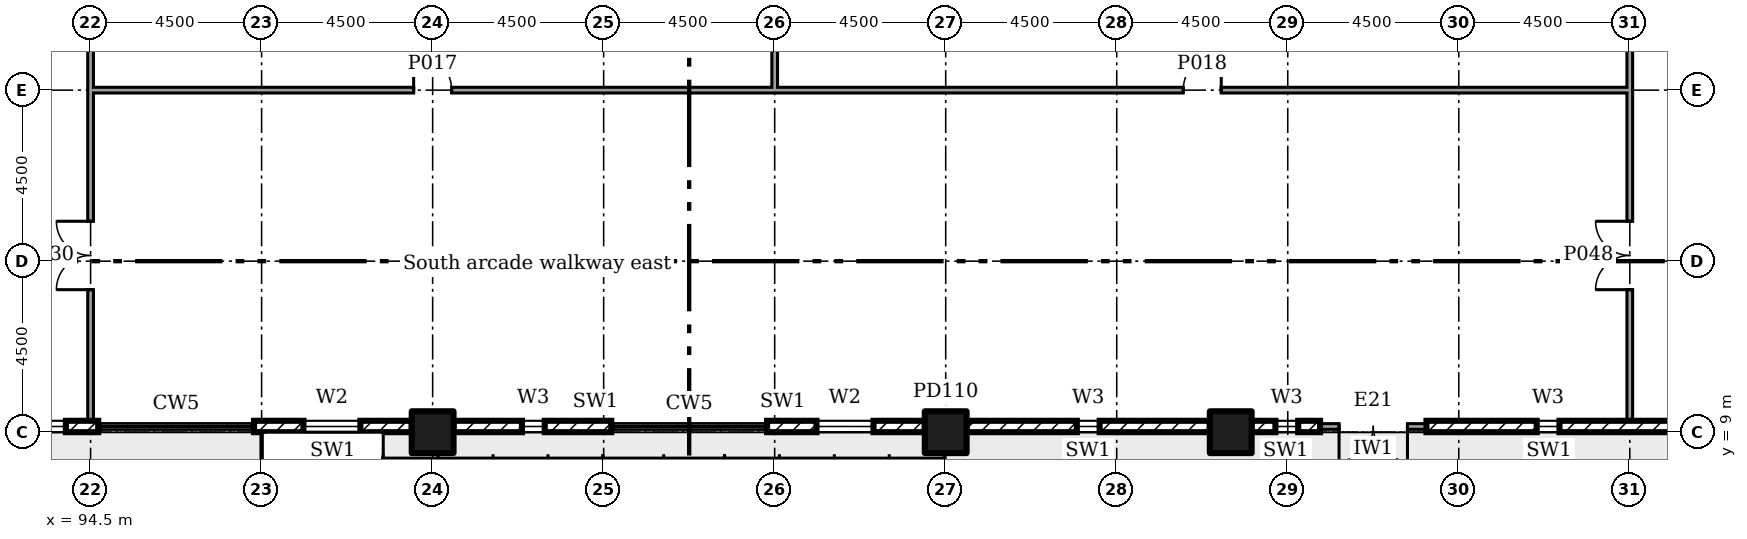
"""IFC4 building model, lengths in metres.
Left out: names, types, materials, properties, quantities, classifications, styles, units other than length and angle.
Written with IfcOpenShell. Run it as: python <this file> out.ifc"""

import sys

from ifc_helpers import new_model, si_unit, direction, frame, frame_2d, origin, origin_2d, place, context, subcontext, project, spatial, rectangle, extrude, element, fill, save


model = new_model("IFC4")
c1 = context("Model", 3, precision=1e-05, world=origin(), true_north=direction((0.0, 1.0)))
c2 = subcontext(c1, "Body", "Model", "MODEL_VIEW")
j1 = project(units=[si_unit("LENGTHUNIT", "METRE"), si_unit("PLANEANGLEUNIT", "RADIAN")], contexts=[c1])
p1 = place(None, origin())
s1 = spatial("IfcSite", under=j1, at=p1, CompositionType="ELEMENT")
p2 = place(p1, origin())
s2 = spatial("IfcBuilding", under=s1, at=p2, CompositionType="ELEMENT")
p3 = place(p2, frame((0.0, 0.0, 6.0)))
s3 = spatial("IfcBuildingStorey", under=s2, at=p3, CompositionType="ELEMENT", Elevation=6.0)
for number, where in (
    (1, (103.5, 9.0, 0.0)),
    (2, (117.0, 9.0, 0.0)),
    (3, (124.5, 9.0, 0.0)),
):
    element("IfcColumn", number, at=place(p3, frame(where)), inside=s3, PredefinedType="COLUMN", context=c2, shape_type="SweptSolid", body=[
        extrude(rectangle(XDim=1.1, YDim=1.1, at=origin_2d()), origin(), (0.0, 0.0, 1.0), 5.5),
    ])
p4 = place(p3, frame((90.55, 9.15, 0.0)))
e4 = element("IfcWall", 4, at=p4, inside=s3, PredefinedType="ELEMENTEDWALL", context=c2, shape_type="SweptSolid", body=[
    extrude(rectangle(XDim=4.15, YDim=0.3, at=frame_2d((2.075, 0.0))), origin(), (0.0, 0.0, 1.0), 5.05),
])
p5 = place(p4, frame((0.9, 0.0, 0.45)))
e5 = element("IfcOpeningElement", 5, at=p5, cuts=e4, PredefinedType="OPENING", context=c2, shape_type="SweptSolid", body=[
    extrude(rectangle(XDim=2.4, YDim=2.4, at=frame_2d((1.2, 1.2))), frame((0.0, 0.16, 0.0), z_axis=(0.0, -1.0, 0.0), x_axis=(1.0, 0.0, 0.0)), (0.0, 0.0, 1.0), 0.32),
])
p6 = place(p3, frame((98.8, 9.15, 0.0)))
e6 = element("IfcWall", 6, at=p6, inside=s3, PredefinedType="ELEMENTEDWALL", context=c2, shape_type="SweptSolid", body=[
    extrude(rectangle(XDim=4.15, YDim=0.3, at=frame_2d((2.075, 0.0))), origin(), (0.0, 0.0, 1.0), 5.05),
])
p7 = place(p6, frame((1.3, 0.0, 0.9)))
e7 = element("IfcOpeningElement", 7, at=p7, cuts=e6, PredefinedType="OPENING", context=c2, shape_type="SweptSolid", body=[
    extrude(rectangle(XDim=1.5, YDim=1.8, at=frame_2d((0.75, 0.9))), frame((0.0, 0.16, 0.0), z_axis=(0.0, -1.0, 0.0), x_axis=(1.0, 0.0, 0.0)), (0.0, 0.0, 1.0), 0.32),
])
p8 = place(p3, frame((104.05, 9.15, 0.0)))
e8 = element("IfcWall", 8, at=p8, inside=s3, PredefinedType="ELEMENTEDWALL", context=c2, shape_type="SweptSolid", body=[
    extrude(rectangle(XDim=4.15, YDim=0.3, at=frame_2d((2.075, 0.0))), origin(), (0.0, 0.0, 1.0), 5.05),
])
p9 = place(p8, frame((1.8, 0.0, 0.45)))
e9 = element("IfcOpeningElement", 9, at=p9, cuts=e8, PredefinedType="OPENING", context=c2, shape_type="SweptSolid", body=[
    extrude(rectangle(XDim=0.6, YDim=2.4, at=frame_2d((0.3, 1.2))), frame((0.0, 0.16, 0.0), z_axis=(0.0, -1.0, 0.0), x_axis=(1.0, 0.0, 0.0)), (0.0, 0.0, 1.0), 0.32),
])
p10 = place(p3, frame((112.3, 9.15, 0.0)))
e10 = element("IfcWall", 10, at=p10, inside=s3, PredefinedType="ELEMENTEDWALL", context=c2, shape_type="SweptSolid", body=[
    extrude(rectangle(XDim=4.15, YDim=0.3, at=frame_2d((2.075, 0.0))), origin(), (0.0, 0.0, 1.0), 5.05),
])
p11 = place(p10, frame((1.3, 0.0, 0.9)))
e11 = element("IfcOpeningElement", 11, at=p11, cuts=e10, PredefinedType="OPENING", context=c2, shape_type="SweptSolid", body=[
    extrude(rectangle(XDim=1.5, YDim=1.8, at=frame_2d((0.75, 0.9))), frame((0.0, 0.16, 0.0), z_axis=(0.0, -1.0, 0.0), x_axis=(1.0, 0.0, 0.0)), (0.0, 0.0, 1.0), 0.32),
])
p12 = place(p3, frame((117.55, 9.15, 0.0)))
e12 = element("IfcWall", 12, at=p12, inside=s3, PredefinedType="ELEMENTEDWALL", context=c2, shape_type="SweptSolid", body=[
    extrude(rectangle(XDim=6.4, YDim=0.3, at=frame_2d((3.2, 0.0))), origin(), (0.0, 0.0, 1.0), 5.05),
])
p13 = place(p12, frame((2.9, 0.0, 0.45)))
e13 = element("IfcOpeningElement", 13, at=p13, cuts=e12, PredefinedType="OPENING", context=c2, shape_type="SweptSolid", body=[
    extrude(rectangle(XDim=0.6, YDim=2.4, at=frame_2d((0.3, 1.2))), frame((0.0, 0.16, 0.0), z_axis=(0.0, -1.0, 0.0), x_axis=(1.0, 0.0, 0.0)), (0.0, 0.0, 1.0), 0.32),
])
p14 = place(p3, frame((125.05, 9.15, 0.0)))
e14 = element("IfcWall", 14, at=p14, inside=s3, PredefinedType="ELEMENTEDWALL", context=c2, shape_type="SweptSolid", body=[
    extrude(rectangle(XDim=1.8, YDim=0.3, at=frame_2d((0.9, 0.0))), origin(), (0.0, 0.0, 1.0), 5.05),
])
p15 = place(p14, frame((0.625, 0.0, 0.45)))
e15 = element("IfcOpeningElement", 15, at=p15, cuts=e14, PredefinedType="OPENING", context=c2, shape_type="SweptSolid", body=[
    extrude(rectangle(XDim=0.6, YDim=2.4, at=frame_2d((0.3, 1.2))), frame((0.0, 0.16, 0.0), z_axis=(0.0, -1.0, 0.0), x_axis=(1.0, 0.0, 0.0)), (0.0, 0.0, 1.0), 0.32),
])
p16 = place(p3, frame((126.85, 9.15, 0.0)))
e16 = element("IfcWall", 16, at=p16, inside=s3, PredefinedType="SOLIDWALL", context=c2, shape_type="SweptSolid", body=[
    extrude(rectangle(XDim=2.8, YDim=0.15, at=frame_2d((1.4, 0.0))), origin(), (0.0, 0.0, 1.0), 5.05),
])
p17 = place(p16, frame((0.5, 0.0, 0.0)))
e17 = element("IfcOpeningElement", 17, at=p17, cuts=e16, PredefinedType="OPENING", context=c2, shape_type="SweptSolid", body=[
    extrude(rectangle(XDim=1.8, YDim=2.4, at=frame_2d((0.9, 1.2))), frame((0.0, 0.085, 0.0), z_axis=(0.0, -1.0, 0.0), x_axis=(1.0, 0.0, 0.0)), (0.0, 0.0, 1.0), 0.17),
])
p18 = place(p3, frame((129.65, 9.15, 0.0)))
e18 = element("IfcWall", 18, at=p18, inside=s3, PredefinedType="ELEMENTEDWALL", context=c2, shape_type="SweptSolid", body=[
    extrude(rectangle(XDim=6.45, YDim=0.3, at=frame_2d((3.225, 0.0))), origin(), (0.0, 0.0, 1.0), 5.05),
])
p19 = place(p18, frame((2.9, 0.0, 0.45)))
e19 = element("IfcOpeningElement", 19, at=p19, cuts=e18, PredefinedType="OPENING", context=c2, shape_type="SweptSolid", body=[
    extrude(rectangle(XDim=0.6, YDim=2.4, at=frame_2d((0.3, 1.2))), frame((0.0, 0.16, 0.0), z_axis=(0.0, -1.0, 0.0), x_axis=(1.0, 0.0, 0.0)), (0.0, 0.0, 1.0), 0.32),
])
p20 = place(p3, frame((94.5, 9.3, 0.0), z_axis=(0.0, 0.0, 1.0), x_axis=(0.0, 1.0, 0.0)))
e20 = element("IfcWall", 20, at=p20, inside=s3, PredefinedType="PARTITIONING", context=c2, shape_type="SweptSolid", body=[
    extrude(rectangle(XDim=8.775, YDim=0.15, at=frame_2d((4.387, 0.0))), origin(), (0.0, 0.0, 1.0), 5.05),
])
p21 = place(p20, frame((3.45, 0.0, 0.0)))
e21 = element("IfcOpeningElement", 21, at=p21, cuts=e20, PredefinedType="OPENING", context=c2, shape_type="SweptSolid", body=[
    extrude(rectangle(XDim=1.8, YDim=2.1, at=frame_2d((0.9, 1.05))), frame((0.0, 0.085, 0.0), z_axis=(0.0, -1.0, 0.0), x_axis=(1.0, 0.0, 0.0)), (0.0, 0.0, 1.0), 0.17),
])
p22 = place(p3, frame((94.5, 18.0, 0.0), z_axis=(0.0, 0.0, 1.0), x_axis=(0.0, 1.0, 0.0)))
e22 = element("IfcWall", 22, at=p22, inside=s3, PredefinedType="PARTITIONING", context=c2, shape_type="SweptSolid", body=[
    extrude(rectangle(XDim=4.425, YDim=0.15, at=frame_2d((2.212, 0.0))), origin(), (0.0, 0.0, 1.0), 5.05),
])
p23 = place(p3, frame((135.0, 9.3, 0.0), z_axis=(0.0, 0.0, 1.0), x_axis=(0.0, 1.0, 0.0)))
e23 = element("IfcWall", 23, at=p23, inside=s3, PredefinedType="PARTITIONING", context=c2, shape_type="SweptSolid", body=[
    extrude(rectangle(XDim=8.775, YDim=0.15, at=frame_2d((4.387, 0.0))), origin(), (0.0, 0.0, 1.0), 5.05),
])
p24 = place(p23, frame((3.45, 0.0, 0.0)))
e24 = element("IfcOpeningElement", 24, at=p24, cuts=e23, PredefinedType="OPENING", context=c2, shape_type="SweptSolid", body=[
    extrude(rectangle(XDim=1.8, YDim=2.1, at=frame_2d((0.9, 1.05))), frame((0.0, 0.085, 0.0), z_axis=(0.0, -1.0, 0.0), x_axis=(1.0, 0.0, 0.0)), (0.0, 0.0, 1.0), 0.17),
])
p25 = place(p3, frame((94.575, 18.0, 0.0)))
e25 = element("IfcWall", 25, at=p25, inside=s3, PredefinedType="PARTITIONING", context=c2, shape_type="SweptSolid", body=[
    extrude(rectangle(XDim=18.0, YDim=0.15, at=frame_2d((9.0, 0.0))), origin(), (0.0, 0.0, 1.0), 5.05),
])
p26 = place(p25, frame((8.425, 0.0, 0.0)))
e26 = element("IfcOpeningElement", 26, at=p26, cuts=e25, PredefinedType="OPENING", context=c2, shape_type="SweptSolid", body=[
    extrude(rectangle(XDim=1.0, YDim=2.1, at=frame_2d((0.5, 1.05))), frame((0.0, 0.085, 0.0), z_axis=(0.0, -1.0, 0.0), x_axis=(1.0, 0.0, 0.0)), (0.0, 0.0, 1.0), 0.17),
])
p27 = place(p3, frame((112.5, 18.0, 0.0)))
e27 = element("IfcWall", 27, at=p27, inside=s3, PredefinedType="PARTITIONING", context=c2, shape_type="SweptSolid", body=[
    extrude(rectangle(XDim=22.425, YDim=0.15, at=frame_2d((11.212, 0.0))), origin(), (0.0, 0.0, 1.0), 5.05),
])
p28 = place(p27, frame((10.75, 0.0, 0.0)))
e28 = element("IfcOpeningElement", 28, at=p28, cuts=e27, PredefinedType="OPENING", context=c2, shape_type="SweptSolid", body=[
    extrude(rectangle(XDim=1.0, YDim=2.1, at=frame_2d((0.5, 1.05))), frame((0.0, 0.085, 0.0), z_axis=(0.0, -1.0, 0.0), x_axis=(1.0, 0.0, 0.0)), (0.0, 0.0, 1.0), 0.17),
])
p29 = place(p3, frame((135.0, 18.0, 0.0), z_axis=(0.0, 0.0, 1.0), x_axis=(0.0, 1.0, 0.0)))
e29 = element("IfcWall", 29, at=p29, inside=s3, PredefinedType="PARTITIONING", context=c2, shape_type="SweptSolid", body=[
    extrude(rectangle(XDim=9.075, YDim=0.15, at=frame_2d((4.538, 0.0))), origin(), (0.0, 0.0, 1.0), 5.05),
])
p30 = place(p3, frame((112.5, 18.075, 0.0), z_axis=(0.0, 0.0, 1.0), x_axis=(0.0, 1.0, 0.0)))
e30 = element("IfcWall", 30, at=p30, inside=s3, PredefinedType="PARTITIONING", context=c2, shape_type="SweptSolid", body=[
    extrude(rectangle(XDim=7.93, YDim=0.15, at=frame_2d((3.965, 0.0))), origin(), (0.0, 0.0, 1.0), 5.05),
])
p31 = place(p5, origin())
e31 = element("IfcWindow", 31, at=p31, inside=s3, PartitioningType="SINGLE_PANEL", PredefinedType="WINDOW", context=c2, shape_type="SweptSolid", body=[
    extrude(rectangle(XDim=2.4, YDim=2.4, at=frame_2d((1.2, 1.2))), frame((0.0, 0.03, 0.0), z_axis=(0.0, -1.0, 0.0), x_axis=(1.0, 0.0, 0.0)), (0.0, 0.0, 1.0), 0.06),
])
fill(e5, e31)
p32 = place(p7, origin())
e32 = element("IfcWindow", 32, at=p32, inside=s3, PartitioningType="SINGLE_PANEL", PredefinedType="WINDOW", context=c2, shape_type="SweptSolid", body=[
    extrude(rectangle(XDim=1.5, YDim=1.8, at=frame_2d((0.75, 0.9))), frame((0.0, 0.03, 0.0), z_axis=(0.0, -1.0, 0.0), x_axis=(1.0, 0.0, 0.0)), (0.0, 0.0, 1.0), 0.06),
])
fill(e7, e32)
p33 = place(p9, origin())
e33 = element("IfcWindow", 33, at=p33, inside=s3, PartitioningType="SINGLE_PANEL", PredefinedType="WINDOW", context=c2, shape_type="SweptSolid", body=[
    extrude(rectangle(XDim=0.6, YDim=2.4, at=frame_2d((0.3, 1.2))), frame((0.0, 0.03, 0.0), z_axis=(0.0, -1.0, 0.0), x_axis=(1.0, 0.0, 0.0)), (0.0, 0.0, 1.0), 0.06),
])
fill(e9, e33)
p34 = place(p11, origin())
e34 = element("IfcWindow", 34, at=p34, inside=s3, PartitioningType="SINGLE_PANEL", PredefinedType="WINDOW", context=c2, shape_type="SweptSolid", body=[
    extrude(rectangle(XDim=1.5, YDim=1.8, at=frame_2d((0.75, 0.9))), frame((0.0, 0.03, 0.0), z_axis=(0.0, -1.0, 0.0), x_axis=(1.0, 0.0, 0.0)), (0.0, 0.0, 1.0), 0.06),
])
fill(e11, e34)
p35 = place(p13, origin())
e35 = element("IfcWindow", 35, at=p35, inside=s3, PartitioningType="SINGLE_PANEL", PredefinedType="WINDOW", context=c2, shape_type="SweptSolid", body=[
    extrude(rectangle(XDim=0.6, YDim=2.4, at=frame_2d((0.3, 1.2))), frame((0.0, 0.03, 0.0), z_axis=(0.0, -1.0, 0.0), x_axis=(1.0, 0.0, 0.0)), (0.0, 0.0, 1.0), 0.06),
])
fill(e13, e35)
p36 = place(p15, origin())
e36 = element("IfcWindow", 36, at=p36, inside=s3, PartitioningType="SINGLE_PANEL", PredefinedType="WINDOW", context=c2, shape_type="SweptSolid", body=[
    extrude(rectangle(XDim=0.6, YDim=2.4, at=frame_2d((0.3, 1.2))), frame((0.0, 0.03, 0.0), z_axis=(0.0, -1.0, 0.0), x_axis=(1.0, 0.0, 0.0)), (0.0, 0.0, 1.0), 0.06),
])
fill(e15, e36)
p37 = place(p17, frame((1.8, 0.0, 0.0), x_axis=(-1.0, 0.0, 0.0)))
e37 = element("IfcDoor", 37, at=p37, inside=s3, OperationType="DOUBLE_DOOR_DOUBLE_SWING", PredefinedType="NOTDEFINED", context=c2, shape_type="SweptSolid", body=[
    extrude(rectangle(XDim=1.8, YDim=2.4, at=frame_2d((0.9, 1.2))), frame((0.0, 0.025, 0.0), z_axis=(0.0, -1.0, 0.0), x_axis=(1.0, 0.0, 0.0)), (0.0, 0.0, 1.0), 0.05),
])
fill(e17, e37)
p38 = place(p19, origin())
e38 = element("IfcWindow", 38, at=p38, inside=s3, PartitioningType="SINGLE_PANEL", PredefinedType="WINDOW", context=c2, shape_type="SweptSolid", body=[
    extrude(rectangle(XDim=0.6, YDim=2.4, at=frame_2d((0.3, 1.2))), frame((0.0, 0.03, 0.0), z_axis=(0.0, -1.0, 0.0), x_axis=(1.0, 0.0, 0.0)), (0.0, 0.0, 1.0), 0.06),
])
fill(e19, e38)
p39 = place(p26, origin())
e39 = element("IfcDoor", 39, at=p39, inside=s3, OperationType="SINGLE_SWING_RIGHT", PredefinedType="DOOR", context=c2, shape_type="SweptSolid", body=[
    extrude(rectangle(XDim=1.0, YDim=2.1, at=frame_2d((0.5, 1.05))), frame((0.0, 0.025, 0.0), z_axis=(0.0, -1.0, 0.0), x_axis=(1.0, 0.0, 0.0)), (0.0, 0.0, 1.0), 0.05),
])
fill(e26, e39)
p40 = place(p28, origin())
e40 = element("IfcDoor", 40, at=p40, inside=s3, OperationType="SINGLE_SWING_LEFT", PredefinedType="DOOR", context=c2, shape_type="SweptSolid", body=[
    extrude(rectangle(XDim=1.0, YDim=2.1, at=frame_2d((0.5, 1.05))), frame((0.0, 0.025, 0.0), z_axis=(0.0, -1.0, 0.0), x_axis=(1.0, 0.0, 0.0)), (0.0, 0.0, 1.0), 0.05),
])
fill(e28, e40)
p41 = place(p21, origin())
e41 = element("IfcDoor", 41, at=p41, inside=s3, OperationType="DOUBLE_DOOR_SINGLE_SWING", PredefinedType="DOOR", context=c2, shape_type="SweptSolid", body=[
    extrude(rectangle(XDim=1.8, YDim=2.1, at=frame_2d((0.9, 1.05))), frame((0.0, 0.025, 0.0), z_axis=(0.0, -1.0, 0.0), x_axis=(1.0, 0.0, 0.0)), (0.0, 0.0, 1.0), 0.05),
])
fill(e21, e41)
p42 = place(p24, origin())
e42 = element("IfcDoor", 42, at=p42, inside=s3, OperationType="DOUBLE_DOOR_SINGLE_SWING", PredefinedType="DOOR", context=c2, shape_type="SweptSolid", body=[
    extrude(rectangle(XDim=1.8, YDim=2.1, at=frame_2d((0.9, 1.05))), frame((0.0, 0.025, 0.0), z_axis=(0.0, -1.0, 0.0), x_axis=(1.0, 0.0, 0.0)), (0.0, 0.0, 1.0), 0.05),
])
fill(e24, e42)
save(model, sys.argv[1])
